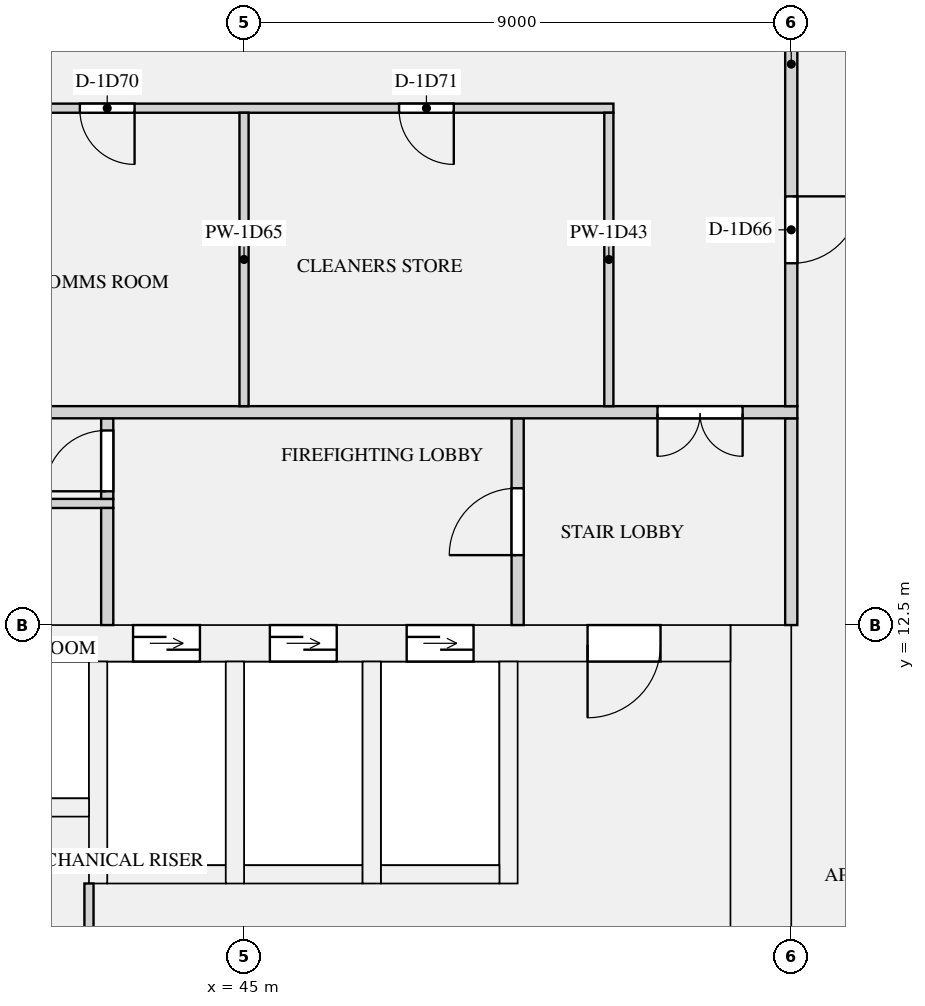
"""IFC4 building model, lengths in metres.
Left out: names, types, materials, properties, quantities, classifications, styles, units other than length and angle.
Written with IfcOpenShell. Run it as: python <this file> out.ifc"""

import sys

from ifc_helpers import new_model, si_unit, direction, frame, frame_2d, origin, place, context, subcontext, project, spatial, rectangle, extrude, element, fill, save


model = new_model("IFC4")
c1 = context("Model", 3, precision=1e-05, world=origin(), true_north=direction((0.0, 1.0)))
c2 = subcontext(c1, "Body", "Model", "MODEL_VIEW")
j1 = project(units=[si_unit("LENGTHUNIT", "METRE"), si_unit("PLANEANGLEUNIT", "RADIAN")], contexts=[c1])
p1 = place(None, origin())
s1 = spatial("IfcSite", under=j1, at=p1, CompositionType="ELEMENT")
p2 = place(p1, origin())
s2 = spatial("IfcBuilding", under=s1, at=p2, CompositionType="ELEMENT")
p3 = place(p2, frame((0.0, 0.0, 47.85)))
s3 = spatial("IfcBuildingStorey", under=s2, at=p3, CompositionType="ELEMENT", Elevation=47.85)
p4 = place(p3, frame((53.5, 0.0, 0.0), z_axis=(0.0, 0.0, 1.0), x_axis=(0.0, 1.0, 0.0)))
e1 = element("IfcWall", 1, at=p4, inside=s3, PredefinedType="SHEAR", context=c2, shape_type="SweptSolid", body=[
    extrude(rectangle(XDim=12.5, YDim=1.0, at=frame_2d((6.25, 0.0))), origin(), (0.0, 0.0, 1.0), 3.15),
])
p5 = place(p3, frame((19.0, 12.2, 0.0), z_axis=(0.0, 0.0, 1.0), x_axis=(1.0, 0.0, 0.0)))
e2 = element("IfcWall", 2, at=p5, inside=s3, PredefinedType="SHEAR", context=c2, shape_type="SweptSolid", body=[
    extrude(rectangle(XDim=34.0, YDim=0.6, at=frame_2d((17.0, 0.0))), origin(), (0.0, 0.0, 1.0), 3.15),
])
p6 = place(p5, frame((4.475, 0.0, 0.0)))
e3 = element("IfcOpeningElement", 3, at=p6, cuts=e2, PredefinedType="OPENING", context=c2, shape_type="SweptSolid", body=[
    extrude(rectangle(XDim=1.2, YDim=2.1, at=frame_2d((0.6, 1.05))), frame((0.0, 0.31, 0.0), z_axis=(0.0, -1.0, 0.0), x_axis=(1.0, 0.0, 0.0)), (0.0, 0.0, 1.0), 0.62),
])
p7 = place(p5, frame((7.325, 0.0, 0.0)))
e4 = element("IfcOpeningElement", 4, at=p7, cuts=e2, PredefinedType="OPENING", context=c2, shape_type="SweptSolid", body=[
    extrude(rectangle(XDim=1.2, YDim=2.1, at=frame_2d((0.6, 1.05))), frame((0.0, 0.31, 0.0), z_axis=(0.0, -1.0, 0.0), x_axis=(1.0, 0.0, 0.0)), (0.0, 0.0, 1.0), 0.62),
])
p8 = place(p5, frame((10.175, 0.0, 0.0)))
e5 = element("IfcOpeningElement", 5, at=p8, cuts=e2, PredefinedType="OPENING", context=c2, shape_type="SweptSolid", body=[
    extrude(rectangle(XDim=1.2, YDim=2.1, at=frame_2d((0.6, 1.05))), frame((0.0, 0.31, 0.0), z_axis=(0.0, -1.0, 0.0), x_axis=(1.0, 0.0, 0.0)), (0.0, 0.0, 1.0), 0.62),
])
p9 = place(p5, frame((13.025, 0.0, 0.0)))
e6 = element("IfcOpeningElement", 6, at=p9, cuts=e2, PredefinedType="OPENING", context=c2, shape_type="SweptSolid", body=[
    extrude(rectangle(XDim=1.2, YDim=2.1, at=frame_2d((0.6, 1.05))), frame((0.0, 0.31, 0.0), z_axis=(0.0, -1.0, 0.0), x_axis=(1.0, 0.0, 0.0)), (0.0, 0.0, 1.0), 0.62),
])
p10 = place(p5, frame((15.875, 0.0, 0.0)))
e7 = element("IfcOpeningElement", 7, at=p10, cuts=e2, PredefinedType="OPENING", context=c2, shape_type="SweptSolid", body=[
    extrude(rectangle(XDim=1.2, YDim=2.1, at=frame_2d((0.6, 1.05))), frame((0.0, 0.31, 0.0), z_axis=(0.0, -1.0, 0.0), x_axis=(1.0, 0.0, 0.0)), (0.0, 0.0, 1.0), 0.62),
])
p11 = place(p5, frame((24.175, 0.0, 0.0)))
e8 = element("IfcOpeningElement", 8, at=p11, cuts=e2, PredefinedType="OPENING", context=c2, shape_type="SweptSolid", body=[
    extrude(rectangle(XDim=1.1, YDim=2.1, at=frame_2d((0.55, 1.05))), frame((0.0, 0.31, 0.0), z_axis=(0.0, -1.0, 0.0), x_axis=(1.0, 0.0, 0.0)), (0.0, 0.0, 1.0), 0.62),
])
p12 = place(p5, frame((26.425, 0.0, 0.0)))
e9 = element("IfcOpeningElement", 9, at=p12, cuts=e2, PredefinedType="OPENING", context=c2, shape_type="SweptSolid", body=[
    extrude(rectangle(XDim=1.1, YDim=2.1, at=frame_2d((0.55, 1.05))), frame((0.0, 0.31, 0.0), z_axis=(0.0, -1.0, 0.0), x_axis=(1.0, 0.0, 0.0)), (0.0, 0.0, 1.0), 0.62),
])
p13 = place(p5, frame((28.675, 0.0, 0.0)))
e10 = element("IfcOpeningElement", 10, at=p13, cuts=e2, PredefinedType="OPENING", context=c2, shape_type="SweptSolid", body=[
    extrude(rectangle(XDim=1.1, YDim=2.1, at=frame_2d((0.55, 1.05))), frame((0.0, 0.31, 0.0), z_axis=(0.0, -1.0, 0.0), x_axis=(1.0, 0.0, 0.0)), (0.0, 0.0, 1.0), 0.62),
])
p14 = place(p5, frame((1.15, 0.0, 0.0)))
e11 = element("IfcOpeningElement", 11, at=p14, cuts=e2, PredefinedType="OPENING", context=c2, shape_type="SweptSolid", body=[
    extrude(rectangle(XDim=1.2, YDim=2.1, at=frame_2d((0.6, 1.05))), frame((0.0, 0.31, 0.0), z_axis=(0.0, -1.0, 0.0), x_axis=(1.0, 0.0, 0.0)), (0.0, 0.0, 1.0), 0.62),
])
p15 = place(p5, frame((31.65, 0.0, 0.0)))
e12 = element("IfcOpeningElement", 12, at=p15, cuts=e2, PredefinedType="OPENING", context=c2, shape_type="SweptSolid", body=[
    extrude(rectangle(XDim=1.2, YDim=2.1, at=frame_2d((0.6, 1.05))), frame((0.0, 0.31, 0.0), z_axis=(0.0, -1.0, 0.0), x_axis=(1.0, 0.0, 0.0)), (0.0, 0.0, 1.0), 0.62),
])
p16 = place(p3, frame((39.9, 9.5, 0.0), z_axis=(0.0, 0.0, 1.0), x_axis=(1.0, 0.0, 0.0)))
e13 = element("IfcWall", 13, at=p16, inside=s3, PredefinedType="SHEAR", context=c2, shape_type="SweptSolid", body=[
    extrude(rectangle(XDim=2.55, YDim=0.3, at=frame_2d((1.275, 0.0))), origin(), (0.0, 0.0, 1.0), 3.15),
])
p17 = place(p3, frame((42.75, 8.4, 0.0), z_axis=(0.0, 0.0, 1.0), x_axis=(1.0, 0.0, 0.0)))
e14 = element("IfcWall", 14, at=p17, inside=s3, PredefinedType="SHEAR", context=c2, shape_type="SweptSolid", body=[
    extrude(rectangle(XDim=1.95, YDim=0.3, at=frame_2d((0.975, 0.0))), origin(), (0.0, 0.0, 1.0), 3.15),
])
p18 = place(p3, frame((42.6, 8.25, 0.0), z_axis=(0.0, 0.0, 1.0), x_axis=(0.0, 1.0, 0.0)))
e15 = element("IfcWall", 15, at=p18, inside=s3, PredefinedType="SHEAR", context=c2, shape_type="SweptSolid", body=[
    extrude(rectangle(XDim=3.65, YDim=0.3, at=frame_2d((1.825, 0.0))), origin(), (0.0, 0.0, 1.0), 3.15),
])
p19 = place(p3, frame((45.0, 8.4, 0.0), z_axis=(0.0, 0.0, 1.0), x_axis=(1.0, 0.0, 0.0)))
e16 = element("IfcWall", 16, at=p19, inside=s3, PredefinedType="SHEAR", context=c2, shape_type="SweptSolid", body=[
    extrude(rectangle(XDim=1.95, YDim=0.3, at=frame_2d((0.975, 0.0))), origin(), (0.0, 0.0, 1.0), 3.15),
])
p20 = place(p3, frame((44.85, 8.25, 0.0), z_axis=(0.0, 0.0, 1.0), x_axis=(0.0, 1.0, 0.0)))
e17 = element("IfcWall", 17, at=p20, inside=s3, PredefinedType="SHEAR", context=c2, shape_type="SweptSolid", body=[
    extrude(rectangle(XDim=3.65, YDim=0.3, at=frame_2d((1.825, 0.0))), origin(), (0.0, 0.0, 1.0), 3.15),
])
p21 = place(p3, frame((47.25, 8.4, 0.0), z_axis=(0.0, 0.0, 1.0), x_axis=(1.0, 0.0, 0.0)))
e18 = element("IfcWall", 18, at=p21, inside=s3, PredefinedType="SHEAR", context=c2, shape_type="SweptSolid", body=[
    extrude(rectangle(XDim=1.95, YDim=0.3, at=frame_2d((0.975, 0.0))), origin(), (0.0, 0.0, 1.0), 3.15),
])
for number, where, z_axis, x_axis in (
    (19, (47.1, 8.25, 0.0), (0.0, 0.0, 1.0), (0.0, 1.0, 0.0)),
    (20, (49.35, 8.25, 0.0), (0.0, 0.0, 1.0), (0.0, 1.0, 0.0)),
):
    element("IfcWall", number, at=place(p3, frame(where, z_axis=z_axis, x_axis=x_axis)), inside=s3, PredefinedType="SHEAR", context=c2, shape_type="SweptSolid", body=[
        extrude(rectangle(XDim=3.65, YDim=0.3, at=frame_2d((1.825, 0.0))), origin(), (0.0, 0.0, 1.0), 3.15),
    ])
p22 = place(p3, frame((38.925, 14.5, 0.0), z_axis=(0.0, 0.0, 1.0), x_axis=(1.0, 0.0, 0.0)))
e21 = element("IfcWall", 21, at=p22, inside=s3, PredefinedType="PARTITIONING", context=c2, shape_type="SweptSolid", body=[
    extrude(rectangle(XDim=3.925, YDim=0.15, at=frame_2d((1.962, 0.0))), origin(), (0.0, 0.0, 1.0), 2.83),
])
p23 = place(p22, frame((1.5, 0.0, 0.0)))
e22 = element("IfcOpeningElement", 22, at=p23, cuts=e21, PredefinedType="OPENING", context=c2, shape_type="SweptSolid", body=[
    extrude(rectangle(XDim=0.9, YDim=2.1, at=frame_2d((0.45, 1.05))), frame((0.0, 0.085, 0.0), z_axis=(0.0, -1.0, 0.0), x_axis=(1.0, 0.0, 0.0)), (0.0, 0.0, 1.0), 0.17),
])
p24 = place(p3, frame((42.45, 6.65, 0.0), z_axis=(0.0, 0.0, 1.0), x_axis=(0.0, 1.0, 0.0)))
e23 = element("IfcWall", 23, at=p24, inside=s3, PredefinedType="PARTITIONING", context=c2, shape_type="SweptSolid", body=[
    extrude(rectangle(XDim=1.6, YDim=0.15, at=frame_2d((0.8, 0.0))), origin(), (0.0, 0.0, 1.0), 2.83),
])
p25 = place(p3, frame((42.75, 12.5, 0.0), z_axis=(0.0, 0.0, 1.0), x_axis=(0.0, 1.0, 0.0)))
e24 = element("IfcWall", 24, at=p25, inside=s3, PredefinedType="PARTITIONING", context=c2, shape_type="SweptSolid", body=[
    extrude(rectangle(XDim=1.925, YDim=0.2, at=frame_2d((0.962, 0.0))), origin(), (0.0, 0.0, 1.0), 2.83),
])
p26 = place(p3, frame((49.5, 12.5, 0.0), z_axis=(0.0, 0.0, 1.0), x_axis=(0.0, 1.0, 0.0)))
e25 = element("IfcWall", 25, at=p26, inside=s3, PredefinedType="PARTITIONING", context=c2, shape_type="SweptSolid", body=[
    extrude(rectangle(XDim=3.4, YDim=0.2, at=frame_2d((1.7, 0.0))), origin(), (0.0, 0.0, 1.0), 2.83),
])
p27 = place(p26, frame((1.15, 0.0, 0.0)))
e26 = element("IfcOpeningElement", 26, at=p27, cuts=e25, PredefinedType="OPENING", context=c2, shape_type="SweptSolid", body=[
    extrude(rectangle(XDim=1.1, YDim=2.1, at=frame_2d((0.55, 1.05))), frame((0.0, 0.11, 0.0), z_axis=(0.0, -1.0, 0.0), x_axis=(1.0, 0.0, 0.0)), (0.0, 0.0, 1.0), 0.22),
])
p28 = place(p3, frame((54.0, 12.5, 0.0), z_axis=(0.0, 0.0, 1.0), x_axis=(0.0, 1.0, 0.0)))
e27 = element("IfcWall", 27, at=p28, inside=s3, PredefinedType="PARTITIONING", context=c2, shape_type="SweptSolid", body=[
    extrude(rectangle(XDim=3.4, YDim=0.2, at=frame_2d((1.7, 0.0))), origin(), (0.0, 0.0, 1.0), 2.83),
])
p29 = place(p3, frame((42.75, 14.575, 0.0), z_axis=(0.0, 0.0, 1.0), x_axis=(0.0, 1.0, 0.0)))
e28 = element("IfcWall", 28, at=p29, inside=s3, PredefinedType="PARTITIONING", context=c2, shape_type="SweptSolid", body=[
    extrude(rectangle(XDim=1.325, YDim=0.2, at=frame_2d((0.663, 0.0))), origin(), (0.0, 0.0, 1.0), 2.83),
])
p30 = place(p29, frame((0.125, 0.0, 0.0)))
e29 = element("IfcOpeningElement", 29, at=p30, cuts=e28, PredefinedType="OPENING", context=c2, shape_type="SweptSolid", body=[
    extrude(rectangle(XDim=1.0, YDim=2.1, at=frame_2d((0.5, 1.05))), frame((0.0, 0.11, 0.0), z_axis=(0.0, -1.0, 0.0), x_axis=(1.0, 0.0, 0.0)), (0.0, 0.0, 1.0), 0.22),
])
p31 = place(p3, frame((20.925, 21.0, 0.0), z_axis=(0.0, 0.0, 1.0), x_axis=(1.0, 0.0, 0.0)))
e30 = element("IfcWall", 30, at=p31, inside=s3, PredefinedType="PARTITIONING", context=c2, shape_type="SweptSolid", body=[
    extrude(rectangle(XDim=30.15, YDim=0.15, at=frame_2d((15.075, 0.0))), origin(), (0.0, 0.0, 1.0), 2.83),
])
p32 = place(p31, frame((4.125, 0.0, 0.0)))
e31 = element("IfcOpeningElement", 31, at=p32, cuts=e30, PredefinedType="OPENING", context=c2, shape_type="SweptSolid", body=[
    extrude(rectangle(XDim=0.9, YDim=2.1, at=frame_2d((0.45, 1.05))), frame((0.0, 0.085, 0.0), z_axis=(0.0, -1.0, 0.0), x_axis=(1.0, 0.0, 0.0)), (0.0, 0.0, 1.0), 0.17),
])
p33 = place(p31, frame((10.875, 0.0, 0.0)))
e32 = element("IfcOpeningElement", 32, at=p33, cuts=e30, PredefinedType="OPENING", context=c2, shape_type="SweptSolid", body=[
    extrude(rectangle(XDim=0.9, YDim=2.1, at=frame_2d((0.45, 1.05))), frame((0.0, 0.085, 0.0), z_axis=(0.0, -1.0, 0.0), x_axis=(1.0, 0.0, 0.0)), (0.0, 0.0, 1.0), 0.17),
])
p34 = place(p31, frame((16.125, 0.0, 0.0)))
e33 = element("IfcOpeningElement", 33, at=p34, cuts=e30, PredefinedType="OPENING", context=c2, shape_type="SweptSolid", body=[
    extrude(rectangle(XDim=0.9, YDim=2.1, at=frame_2d((0.45, 1.05))), frame((0.0, 0.085, 0.0), z_axis=(0.0, -1.0, 0.0), x_axis=(1.0, 0.0, 0.0)), (0.0, 0.0, 1.0), 0.17),
])
p35 = place(p31, frame((21.375, 0.0, 0.0)))
e34 = element("IfcOpeningElement", 34, at=p35, cuts=e30, PredefinedType="OPENING", context=c2, shape_type="SweptSolid", body=[
    extrude(rectangle(XDim=0.9, YDim=2.1, at=frame_2d((0.45, 1.05))), frame((0.0, 0.085, 0.0), z_axis=(0.0, -1.0, 0.0), x_axis=(1.0, 0.0, 0.0)), (0.0, 0.0, 1.0), 0.17),
])
p36 = place(p31, frame((26.625, 0.0, 0.0)))
e35 = element("IfcOpeningElement", 35, at=p36, cuts=e30, PredefinedType="OPENING", context=c2, shape_type="SweptSolid", body=[
    extrude(rectangle(XDim=0.9, YDim=2.1, at=frame_2d((0.45, 1.05))), frame((0.0, 0.085, 0.0), z_axis=(0.0, -1.0, 0.0), x_axis=(1.0, 0.0, 0.0)), (0.0, 0.0, 1.0), 0.17),
])
p37 = place(p3, frame((17.9, 16.0, 0.0), z_axis=(0.0, 0.0, 1.0), x_axis=(1.0, 0.0, 0.0)))
e36 = element("IfcWall", 36, at=p37, inside=s3, PredefinedType="PARTITIONING", context=c2, shape_type="SweptSolid", body=[
    extrude(rectangle(XDim=36.2, YDim=0.2, at=frame_2d((18.1, 0.0))), origin(), (0.0, 0.0, 1.0), 2.83),
])
p38 = place(p37, frame((0.9, 0.0, 0.0)))
e37 = element("IfcOpeningElement", 37, at=p38, cuts=e36, PredefinedType="OPENING", context=c2, shape_type="SweptSolid", body=[
    extrude(rectangle(XDim=1.4, YDim=2.1, at=frame_2d((0.7, 1.05))), frame((0.0, 0.11, 0.0), z_axis=(0.0, -1.0, 0.0), x_axis=(1.0, 0.0, 0.0)), (0.0, 0.0, 1.0), 0.22),
])
p39 = place(p37, frame((33.9, 0.0, 0.0)))
e38 = element("IfcOpeningElement", 38, at=p39, cuts=e36, PredefinedType="OPENING", context=c2, shape_type="SweptSolid", body=[
    extrude(rectangle(XDim=1.4, YDim=2.1, at=frame_2d((0.7, 1.05))), frame((0.0, 0.11, 0.0), z_axis=(0.0, -1.0, 0.0), x_axis=(1.0, 0.0, 0.0)), (0.0, 0.0, 1.0), 0.22),
])
p40 = place(p3, frame((54.0, 16.1, 0.0), z_axis=(0.0, 0.0, 1.0), x_axis=(0.0, 1.0, 0.0)))
e39 = element("IfcWall", 39, at=p40, inside=s3, PredefinedType="PARTITIONING", context=c2, shape_type="SweptSolid", body=[
    extrude(rectangle(XDim=7.8, YDim=0.2, at=frame_2d((3.9, 0.0))), origin(), (0.0, 0.0, 1.0), 2.83),
])
p41 = place(p40, frame((2.35, 0.0, 0.0)))
e40 = element("IfcOpeningElement", 40, at=p41, cuts=e39, PredefinedType="OPENING", context=c2, shape_type="SweptSolid", body=[
    extrude(rectangle(XDim=1.1, YDim=2.1, at=frame_2d((0.55, 1.05))), frame((0.0, 0.11, 0.0), z_axis=(0.0, -1.0, 0.0), x_axis=(1.0, 0.0, 0.0)), (0.0, 0.0, 1.0), 0.22),
])
for number, where, z_axis, x_axis in (
    (41, (51.0, 16.1, 0.0), (0.0, 0.0, 1.0), (0.0, 1.0, 0.0)),
    (42, (45.0, 16.1, 0.0), (0.0, 0.0, 1.0), (0.0, 1.0, 0.0)),
):
    element("IfcWall", number, at=place(p3, frame(where, z_axis=z_axis, x_axis=x_axis)), inside=s3, PredefinedType="PARTITIONING", context=c2, shape_type="SweptSolid", body=[
        extrude(rectangle(XDim=4.825, YDim=0.15, at=frame_2d((2.413, 0.0))), origin(), (0.0, 0.0, 1.0), 2.83),
    ])
p42 = place(p11, origin())
e43 = element("IfcDoor", 43, at=p42, inside=s3, OperationType="DOUBLE_DOOR_SLIDING", PredefinedType="DOOR", context=c2, shape_type="SweptSolid", body=[
    extrude(rectangle(XDim=1.1, YDim=2.1, at=frame_2d((0.55, 1.05))), frame((0.0, 0.025, 0.0), z_axis=(0.0, -1.0, 0.0), x_axis=(1.0, 0.0, 0.0)), (0.0, 0.0, 1.0), 0.05),
])
fill(e8, e43)
p43 = place(p12, origin())
e44 = element("IfcDoor", 44, at=p43, inside=s3, OperationType="DOUBLE_DOOR_SLIDING", PredefinedType="DOOR", context=c2, shape_type="SweptSolid", body=[
    extrude(rectangle(XDim=1.1, YDim=2.1, at=frame_2d((0.55, 1.05))), frame((0.0, 0.025, 0.0), z_axis=(0.0, -1.0, 0.0), x_axis=(1.0, 0.0, 0.0)), (0.0, 0.0, 1.0), 0.05),
])
fill(e9, e44)
p44 = place(p13, origin())
e45 = element("IfcDoor", 45, at=p44, inside=s3, OperationType="DOUBLE_DOOR_SLIDING", PredefinedType="DOOR", context=c2, shape_type="SweptSolid", body=[
    extrude(rectangle(XDim=1.1, YDim=2.1, at=frame_2d((0.55, 1.05))), frame((0.0, 0.025, 0.0), z_axis=(0.0, -1.0, 0.0), x_axis=(1.0, 0.0, 0.0)), (0.0, 0.0, 1.0), 0.05),
])
fill(e10, e45)
p45 = place(p15, frame((1.2, 0.0, 0.0), z_axis=(0.0, 0.0, 1.0), x_axis=(-1.0, 0.0, 0.0)))
e46 = element("IfcDoor", 46, at=p45, inside=s3, OperationType="SINGLE_SWING_RIGHT", PredefinedType="DOOR", context=c2, shape_type="SweptSolid", body=[
    extrude(rectangle(XDim=1.2, YDim=2.1, at=frame_2d((0.6, 1.05))), frame((0.0, 0.025, 0.0), z_axis=(0.0, -1.0, 0.0), x_axis=(1.0, 0.0, 0.0)), (0.0, 0.0, 1.0), 0.05),
])
fill(e12, e46)
p46 = place(p30, origin())
e47 = element("IfcDoor", 47, at=p46, inside=s3, OperationType="SINGLE_SWING_LEFT", PredefinedType="DOOR", context=c2, shape_type="SweptSolid", body=[
    extrude(rectangle(XDim=1.0, YDim=2.1, at=frame_2d((0.5, 1.05))), frame((0.0, 0.025, 0.0), z_axis=(0.0, -1.0, 0.0), x_axis=(1.0, 0.0, 0.0)), (0.0, 0.0, 1.0), 0.05),
])
fill(e29, e47)
p47 = place(p27, origin())
e48 = element("IfcDoor", 48, at=p47, inside=s3, OperationType="SINGLE_SWING_LEFT", PredefinedType="DOOR", context=c2, shape_type="SweptSolid", body=[
    extrude(rectangle(XDim=1.1, YDim=2.1, at=frame_2d((0.55, 1.05))), frame((0.0, 0.025, 0.0), z_axis=(0.0, -1.0, 0.0), x_axis=(1.0, 0.0, 0.0)), (0.0, 0.0, 1.0), 0.05),
])
fill(e26, e48)
p48 = place(p39, frame((1.4, 0.0, 0.0), z_axis=(0.0, 0.0, 1.0), x_axis=(-1.0, 0.0, 0.0)))
e49 = element("IfcDoor", 49, at=p48, inside=s3, OperationType="DOUBLE_DOOR_SINGLE_SWING", PredefinedType="DOOR", context=c2, shape_type="SweptSolid", body=[
    extrude(rectangle(XDim=1.4, YDim=2.1, at=frame_2d((0.7, 1.05))), frame((0.0, 0.025, 0.0), z_axis=(0.0, -1.0, 0.0), x_axis=(1.0, 0.0, 0.0)), (0.0, 0.0, 1.0), 0.05),
])
fill(e38, e49)
p49 = place(p41, frame((1.1, 0.0, 0.0), z_axis=(0.0, 0.0, 1.0), x_axis=(-1.0, 0.0, 0.0)))
e50 = element("IfcDoor", 50, at=p49, inside=s3, OperationType="SINGLE_SWING_LEFT", PredefinedType="DOOR", context=c2, shape_type="SweptSolid", body=[
    extrude(rectangle(XDim=1.1, YDim=2.1, at=frame_2d((0.55, 1.05))), frame((0.0, 0.025, 0.0), z_axis=(0.0, -1.0, 0.0), x_axis=(1.0, 0.0, 0.0)), (0.0, 0.0, 1.0), 0.05),
])
fill(e40, e50)
p50 = place(p35, frame((0.9, 0.0, 0.0), z_axis=(0.0, 0.0, 1.0), x_axis=(-1.0, 0.0, 0.0)))
e51 = element("IfcDoor", 51, at=p50, inside=s3, OperationType="SINGLE_SWING_LEFT", PredefinedType="DOOR", context=c2, shape_type="SweptSolid", body=[
    extrude(rectangle(XDim=0.9, YDim=2.1, at=frame_2d((0.45, 1.05))), frame((0.0, 0.025, 0.0), z_axis=(0.0, -1.0, 0.0), x_axis=(1.0, 0.0, 0.0)), (0.0, 0.0, 1.0), 0.05),
])
fill(e34, e51)
p51 = place(p36, frame((0.9, 0.0, 0.0), z_axis=(0.0, 0.0, 1.0), x_axis=(-1.0, 0.0, 0.0)))
e52 = element("IfcDoor", 52, at=p51, inside=s3, OperationType="SINGLE_SWING_LEFT", PredefinedType="DOOR", context=c2, shape_type="SweptSolid", body=[
    extrude(rectangle(XDim=0.9, YDim=2.1, at=frame_2d((0.45, 1.05))), frame((0.0, 0.025, 0.0), z_axis=(0.0, -1.0, 0.0), x_axis=(1.0, 0.0, 0.0)), (0.0, 0.0, 1.0), 0.05),
])
fill(e35, e52)
save(model, sys.argv[1])
